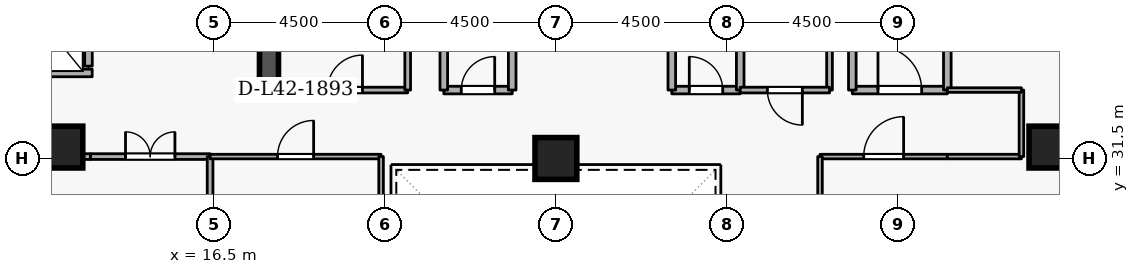
"""IFC4 building model, lengths in metres.
Left out: names, types, materials, properties, quantities, classifications, styles, units other than length and angle.
Written with IfcOpenShell. Run it as: python <this file> out.ifc"""

import sys

from ifc_helpers import new_model, si_unit, direction, frame, frame_2d, origin, origin_2d, place, context, subcontext, project, spatial, rectangle, extrude, element, fill, save


model = new_model("IFC4")
c1 = context("Model", 3, precision=1e-05, world=origin(), true_north=direction((0.0, 1.0)))
c2 = subcontext(c1, "Body", "Model", "MODEL_VIEW")
j1 = project(units=[si_unit("LENGTHUNIT", "METRE"), si_unit("PLANEANGLEUNIT", "RADIAN")], contexts=[c1])
p1 = place(None, origin())
s1 = spatial("IfcSite", under=j1, at=p1, CompositionType="ELEMENT")
p2 = place(p1, origin())
s2 = spatial("IfcBuilding", under=s1, at=p2, CompositionType="ELEMENT")
p3 = place(p2, frame((0.0, 0.0, 159.9)))
s3 = spatial("IfcBuildingStorey", under=s2, at=p3, CompositionType="ELEMENT", Elevation=159.9)
p4 = place(p3, frame((17.95, 33.1, 0.0), z_axis=(0.0, 0.0, 1.0), x_axis=(0.0, 1.0, 0.0)))
e1 = element("IfcWall", 1, at=p4, inside=s3, PredefinedType="SHEAR", context=c2, shape_type="SweptSolid", body=[
    extrude(rectangle(XDim=5.8, YDim=0.5, at=frame_2d((2.9, 0.0))), origin(), (0.0, 0.0, 1.0), 3.6),
])
for number, where, z_axis, x_axis in (
    (2, (12.5, 31.8, 0.0), (0.0, 0.0, 1.0), (1.0, 0.0, 0.0)),
    (3, (38.5, 31.8, 0.0), (0.0, 0.0, 1.0), (1.0, 0.0, 0.0)),
    (4, (25.5, 31.5, 0.0), (0.0, 0.0, 1.0), (1.0, 0.0, 0.0)),
):
    element("IfcColumn", number, at=place(p3, frame(where, z_axis=z_axis, x_axis=x_axis)), inside=s3, PredefinedType="COLUMN", context=c2, shape_type="SweptSolid", body=[
        extrude(rectangle(XDim=1.1, YDim=1.1, at=origin_2d()), origin(), (0.0, 0.0, 1.0), 3.6),
    ])
p5 = place(p3, frame((13.2, 33.93, 0.0), z_axis=(0.0, 0.0, 1.0), x_axis=(0.0, 1.0, 0.0)))
e5 = element("IfcWall", 5, at=p5, inside=s3, PredefinedType="STANDARD", context=c2, shape_type="SweptSolid", body=[
    extrude(rectangle(XDim=1.94, YDim=0.2, at=frame_2d((0.97, 0.0))), origin(), (0.0, 0.0, 1.0), 3.34),
])
p6 = place(p5, frame((0.46, 0.0, 0.0)))
e6 = element("IfcOpeningElement", 6, at=p6, cuts=e5, PredefinedType="OPENING", context=c2, shape_type="SweptSolid", body=[
    extrude(rectangle(XDim=1.02, YDim=2.06, at=frame_2d((0.51, 1.03))), frame((0.0, 0.11, 0.0), z_axis=(0.0, -1.0, 0.0), x_axis=(1.0, 0.0, 0.0)), (0.0, 0.0, 1.0), 0.22),
])
p7 = place(p3, frame((11.002, 33.75, 0.0), z_axis=(0.0, 0.0, 1.0), x_axis=(1.0, 0.0, 0.0)))
e7 = element("IfcWall", 7, at=p7, inside=s3, PredefinedType="STANDARD", context=c2, shape_type="SweptSolid", body=[
    extrude(rectangle(XDim=2.296, YDim=0.2, at=frame_2d((1.148, 0.0))), origin(), (0.0, 0.0, 1.0), 3.34),
])
p8 = place(p3, frame((33.3, 33.3, 0.0), z_axis=(0.0, 0.0, 1.0), x_axis=(1.0, 0.0, 0.0)))
e8 = element("IfcWall", 8, at=p8, inside=s3, PredefinedType="STANDARD", context=c2, shape_type="SweptSolid", body=[
    extrude(rectangle(XDim=2.5, YDim=0.2, at=frame_2d((1.25, 0.0))), origin(), (0.0, 0.0, 1.0), 3.34),
])
p9 = place(p8, frame((0.675, 0.0, 0.0)))
e9 = element("IfcOpeningElement", 9, at=p9, cuts=e8, PredefinedType="OPENING", context=c2, shape_type="SweptSolid", body=[
    extrude(rectangle(XDim=1.15, YDim=2.1, at=frame_2d((0.575, 1.05))), frame((0.0, 0.11, 0.0), z_axis=(0.0, -1.0, 0.0), x_axis=(1.0, 0.0, 0.0)), (0.0, 0.0, 1.0), 0.22),
])
p10 = place(p3, frame((35.8, 33.3, 0.0), z_axis=(0.0, 0.0, 1.0), x_axis=(0.0, 1.0, 0.0)))
e10 = element("IfcWall", 10, at=p10, inside=s3, PredefinedType="STANDARD", context=c2, shape_type="SweptSolid", body=[
    extrude(rectangle(XDim=5.7, YDim=0.2, at=frame_2d((2.85, 0.0))), origin(), (0.0, 0.0, 1.0), 3.34),
])
p11 = place(p3, frame((33.3, 35.6, 0.0), z_axis=(0.0, 0.0, 1.0), x_axis=(0.0, -1.0, 0.0)))
e11 = element("IfcWall", 11, at=p11, inside=s3, PredefinedType="STANDARD", context=c2, shape_type="SweptSolid", body=[
    extrude(rectangle(XDim=2.3, YDim=0.2, at=frame_2d((1.15, 0.0))), origin(), (0.0, 0.0, 1.0), 2.545),
])
p12 = place(p3, frame((22.55, 33.3, 0.0), z_axis=(0.0, 0.0, 1.0), x_axis=(1.0, 0.0, 0.0)))
e12 = element("IfcWall", 12, at=p12, inside=s3, PredefinedType="STANDARD", context=c2, shape_type="SweptSolid", body=[
    extrude(rectangle(XDim=1.8, YDim=0.2, at=frame_2d((0.9, 0.0))), origin(), (0.0, 0.0, 1.0), 3.34),
])
p13 = place(p12, frame((0.46, 0.0, 0.0)))
e13 = element("IfcOpeningElement", 13, at=p13, cuts=e12, PredefinedType="OPENING", context=c2, shape_type="SweptSolid", body=[
    extrude(rectangle(XDim=0.88, YDim=2.04, at=frame_2d((0.44, 1.02))), frame((0.0, 0.11, 0.0), z_axis=(0.0, -1.0, 0.0), x_axis=(1.0, 0.0, 0.0)), (0.0, 0.0, 1.0), 0.22),
])
for number, where, z_axis, x_axis in (
    (14, (24.35, 33.3, 0.0), (0.0, 0.0, 1.0), (0.0, 1.0, 0.0)),
    (15, (22.55, 35.35, 0.0), (0.0, 0.0, 1.0), (0.0, -1.0, 0.0)),
):
    element("IfcWall", number, at=place(p3, frame(where, z_axis=z_axis, x_axis=x_axis)), inside=s3, PredefinedType="STANDARD", context=c2, shape_type="SweptSolid", body=[
        extrude(rectangle(XDim=2.05, YDim=0.2, at=frame_2d((1.025, 0.0))), origin(), (0.0, 0.0, 1.0), 3.34),
    ])
p14 = place(p3, frame((28.55, 33.3, 0.0), z_axis=(0.0, 0.0, 1.0), x_axis=(1.0, 0.0, 0.0)))
e16 = element("IfcWall", 16, at=p14, inside=s3, PredefinedType="STANDARD", context=c2, shape_type="SweptSolid", body=[
    extrude(rectangle(XDim=1.8, YDim=0.2, at=frame_2d((0.9, 0.0))), origin(), (0.0, 0.0, 1.0), 3.34),
])
p15 = place(p14, frame((0.46, 0.0, 0.0)))
e17 = element("IfcOpeningElement", 17, at=p15, cuts=e16, PredefinedType="OPENING", context=c2, shape_type="SweptSolid", body=[
    extrude(rectangle(XDim=0.88, YDim=2.04, at=frame_2d((0.44, 1.02))), frame((0.0, 0.11, 0.0), z_axis=(0.0, -1.0, 0.0), x_axis=(1.0, 0.0, 0.0)), (0.0, 0.0, 1.0), 0.22),
])
for number, where, z_axis, x_axis in (
    (18, (30.35, 33.3, 0.0), (0.0, 0.0, 1.0), (0.0, 1.0, 0.0)),
    (19, (28.55, 35.35, 0.0), (0.0, 0.0, 1.0), (0.0, -1.0, 0.0)),
):
    element("IfcWall", number, at=place(p3, frame(where, z_axis=z_axis, x_axis=x_axis)), inside=s3, PredefinedType="STANDARD", context=c2, shape_type="SweptSolid", body=[
        extrude(rectangle(XDim=2.05, YDim=0.2, at=frame_2d((1.025, 0.0))), origin(), (0.0, 0.0, 1.0), 3.34),
    ])
p16 = place(p3, frame((18.3, 33.3, 0.0), z_axis=(0.0, 0.0, 1.0), x_axis=(1.0, 0.0, 0.0)))
e20 = element("IfcWall", 20, at=p16, inside=s3, PredefinedType="PARTITIONING", context=c2, shape_type="SweptSolid", body=[
    extrude(rectangle(XDim=3.3, YDim=0.15, at=frame_2d((1.65, 0.0))), origin(), (0.0, 0.0, 1.0), 3.34),
])
p17 = place(p16, frame((1.19, 0.0, 0.0)))
e21 = element("IfcOpeningElement", 21, at=p17, cuts=e20, PredefinedType="OPENING", context=c2, shape_type="SweptSolid", body=[
    extrude(rectangle(XDim=0.92, YDim=2.08, at=frame_2d((0.46, 1.04))), frame((0.0, 0.085, 0.0), z_axis=(0.0, -1.0, 0.0), x_axis=(1.0, 0.0, 0.0)), (0.0, 0.0, 1.0), 0.17),
])
p18 = place(p3, frame((21.6, 33.3, 0.0), z_axis=(0.0, 0.0, 1.0), x_axis=(0.0, 1.0, 0.0)))
e22 = element("IfcWall", 22, at=p18, inside=s3, PredefinedType="PARTITIONING", context=c2, shape_type="SweptSolid", body=[
    extrude(rectangle(XDim=2.05, YDim=0.15, at=frame_2d((1.025, 0.0))), origin(), (0.0, 0.0, 1.0), 3.34),
])
p19 = place(p3, frame((32.7, 35.35, 0.0), z_axis=(0.0, 0.0, 1.0), x_axis=(0.0, -1.0, 0.0)))
e23 = element("IfcWall", 23, at=p19, inside=s3, PredefinedType="PARTITIONING", context=c2, shape_type="SweptSolid", body=[
    extrude(rectangle(XDim=2.05, YDim=0.15, at=frame_2d((1.025, 0.0))), origin(), (0.0, 0.0, 1.0), 2.545),
])
p20 = place(p3, frame((32.7, 33.3, 0.0), z_axis=(0.0, 0.0, 1.0), x_axis=(-1.0, 0.0, 0.0)))
e24 = element("IfcWall", 24, at=p20, inside=s3, PredefinedType="PARTITIONING", context=c2, shape_type="SweptSolid", body=[
    extrude(rectangle(XDim=2.35, YDim=0.15, at=frame_2d((1.175, 0.0))), origin(), (0.0, 0.0, 1.0), 3.34),
])
p21 = place(p20, frame((0.715, 0.0, 0.0)))
e25 = element("IfcOpeningElement", 25, at=p21, cuts=e24, PredefinedType="OPENING", context=c2, shape_type="SweptSolid", body=[
    extrude(rectangle(XDim=0.92, YDim=2.08, at=frame_2d((0.46, 1.04))), frame((0.0, 0.085, 0.0), z_axis=(0.0, -1.0, 0.0), x_axis=(1.0, 0.0, 0.0)), (0.0, 0.0, 1.0), 0.17),
])
p22 = place(p3, frame((13.25, 31.55, 0.0), z_axis=(0.0, 0.0, 1.0), x_axis=(1.0, 0.0, 0.0)))
e26 = element("IfcWall", 26, at=p22, inside=s3, PredefinedType="PARTITIONING", context=c2, shape_type="SweptSolid", body=[
    extrude(rectangle(XDim=3.15, YDim=0.15, at=frame_2d((1.575, 0.0))), origin(), (0.0, 0.0, 1.0), 3.34),
])
p23 = place(p22, frame((0.925, 0.0, 0.0)))
e27 = element("IfcOpeningElement", 27, at=p23, cuts=e26, PredefinedType="OPENING", context=c2, shape_type="SweptSolid", body=[
    extrude(rectangle(XDim=1.3, YDim=2.12, at=frame_2d((0.65, 1.06))), frame((0.0, 0.085, 0.0), z_axis=(0.0, -1.0, 0.0), x_axis=(1.0, 0.0, 0.0)), (0.0, 0.0, 1.0), 0.17),
])
p24 = place(p3, frame((16.4, 31.55, 0.0), z_axis=(0.0, 0.0, 1.0), x_axis=(0.0, -1.0, 0.0)))
e28 = element("IfcWall", 28, at=p24, inside=s3, PredefinedType="PARTITIONING", context=c2, shape_type="SweptSolid", body=[
    extrude(rectangle(XDim=4.55, YDim=0.15, at=frame_2d((2.275, 0.0))), origin(), (0.0, 0.0, 1.0), 3.34),
])
p25 = place(p3, frame((10.9, 31.55, 0.0), z_axis=(0.0, 0.0, 1.0), x_axis=(1.0, 0.0, 0.0)))
e29 = element("IfcWall", 29, at=p25, inside=s3, PredefinedType="PARTITIONING", context=c2, shape_type="SweptSolid", body=[
    extrude(rectangle(XDim=2.35, YDim=0.15, at=frame_2d((1.175, 0.0))), origin(), (0.0, 0.0, 1.0), 3.34),
])
p26 = place(p3, frame((16.4, 31.55, 0.0), z_axis=(0.0, 0.0, 1.0), x_axis=(1.0, 0.0, 0.0)))
e30 = element("IfcWall", 30, at=p26, inside=s3, PredefinedType="PARTITIONING", context=c2, shape_type="SweptSolid", body=[
    extrude(rectangle(XDim=4.5, YDim=0.12, at=frame_2d((2.25, 0.0))), origin(), (0.0, 0.0, 1.0), 3.34),
])
p27 = place(p26, frame((1.775, 0.0, 0.0)))
e31 = element("IfcOpeningElement", 31, at=p27, cuts=e30, PredefinedType="OPENING", context=c2, shape_type="SweptSolid", body=[
    extrude(rectangle(XDim=0.95, YDim=2.1, at=frame_2d((0.475, 1.05))), frame((0.0, 0.07, 0.0), z_axis=(0.0, -1.0, 0.0), x_axis=(1.0, 0.0, 0.0)), (0.0, 0.0, 1.0), 0.14),
])
p28 = place(p3, frame((20.9, 31.55, 0.0), z_axis=(0.0, 0.0, 1.0), x_axis=(0.0, -1.0, 0.0)))
e32 = element("IfcWall", 32, at=p28, inside=s3, PredefinedType="PARTITIONING", context=c2, shape_type="SweptSolid", body=[
    extrude(rectangle(XDim=9.1, YDim=0.12, at=frame_2d((4.55, 0.0))), origin(), (0.0, 0.0, 1.0), 3.34),
])
p29 = place(p3, frame((32.45, 31.55, 0.0), z_axis=(0.0, 0.0, 1.0), x_axis=(1.0, 0.0, 0.0)))
e33 = element("IfcWall", 33, at=p29, inside=s3, PredefinedType="PARTITIONING", context=c2, shape_type="SweptSolid", body=[
    extrude(rectangle(XDim=3.35, YDim=0.12, at=frame_2d((1.675, 0.0))), origin(), (0.0, 0.0, 1.0), 3.34),
])
p30 = place(p29, frame((1.15, 0.0, 0.0)))
e34 = element("IfcOpeningElement", 34, at=p30, cuts=e33, PredefinedType="OPENING", context=c2, shape_type="SweptSolid", body=[
    extrude(rectangle(XDim=1.05, YDim=2.1, at=frame_2d((0.525, 1.05))), frame((0.0, 0.07, 0.0), z_axis=(0.0, -1.0, 0.0), x_axis=(1.0, 0.0, 0.0)), (0.0, 0.0, 1.0), 0.14),
])
p31 = place(p3, frame((35.8, 31.55, 0.0), z_axis=(0.0, 0.0, 1.0), x_axis=(1.0, 0.0, 0.0)))
e35 = element("IfcWall", 35, at=p31, inside=s3, PredefinedType="PARTITIONING", context=c2, shape_type="SweptSolid", body=[
    extrude(rectangle(XDim=1.95, YDim=0.12, at=frame_2d((0.975, 0.0))), origin(), (0.0, 0.0, 1.0), 3.34),
])
p32 = place(p3, frame((37.75, 31.55, 0.0), z_axis=(0.0, 0.0, 1.0), x_axis=(0.0, 1.0, 0.0)))
e36 = element("IfcWall", 36, at=p32, inside=s3, PredefinedType="PARTITIONING", context=c2, shape_type="SweptSolid", body=[
    extrude(rectangle(XDim=1.75, YDim=0.12, at=frame_2d((0.875, 0.0))), origin(), (0.0, 0.0, 1.0), 3.34),
])
p33 = place(p3, frame((37.75, 33.3, 0.0), z_axis=(0.0, 0.0, 1.0), x_axis=(-1.0, 0.0, 0.0)))
e37 = element("IfcWall", 37, at=p33, inside=s3, PredefinedType="PARTITIONING", context=c2, shape_type="SweptSolid", body=[
    extrude(rectangle(XDim=1.95, YDim=0.12, at=frame_2d((0.975, 0.0))), origin(), (0.0, 0.0, 1.0), 3.34),
])
p34 = place(p3, frame((32.45, 29.25, 0.0), z_axis=(0.0, 0.0, 1.0), x_axis=(0.0, 1.0, 0.0)))
e38 = element("IfcWall", 38, at=p34, inside=s3, PredefinedType="PARTITIONING", context=c2, shape_type="SweptSolid", body=[
    extrude(rectangle(XDim=2.3, YDim=0.12, at=frame_2d((1.15, 0.0))), origin(), (0.0, 0.0, 1.0), 3.34),
])
p35 = place(p9, origin())
e39 = element("IfcDoor", 39, at=p35, inside=s3, OperationType="SINGLE_SWING_LEFT", PredefinedType="DOOR", context=c2, shape_type="SweptSolid", body=[
    extrude(rectangle(XDim=1.15, YDim=2.1, at=frame_2d((0.575, 1.05))), frame((0.0, 0.025, 0.0), z_axis=(0.0, -1.0, 0.0), x_axis=(1.0, 0.0, 0.0)), (0.0, 0.0, 1.0), 0.05),
])
fill(e9, e39)
p36 = place(p13, origin())
e40 = element("IfcDoor", 40, at=p36, inside=s3, OperationType="SINGLE_SWING_RIGHT", PredefinedType="DOOR", context=c2, shape_type="SweptSolid", body=[
    extrude(rectangle(XDim=0.88, YDim=2.04, at=frame_2d((0.44, 1.02))), frame((0.0, 0.025, 0.0), z_axis=(0.0, -1.0, 0.0), x_axis=(1.0, 0.0, 0.0)), (0.0, 0.0, 1.0), 0.05),
])
fill(e13, e40)
p37 = place(p15, origin())
e41 = element("IfcDoor", 41, at=p37, inside=s3, OperationType="SINGLE_SWING_LEFT", PredefinedType="DOOR", context=c2, shape_type="SweptSolid", body=[
    extrude(rectangle(XDim=0.88, YDim=2.04, at=frame_2d((0.44, 1.02))), frame((0.0, 0.025, 0.0), z_axis=(0.0, -1.0, 0.0), x_axis=(1.0, 0.0, 0.0)), (0.0, 0.0, 1.0), 0.05),
])
fill(e17, e41)
p38 = place(p17, origin())
e42 = element("IfcDoor", 42, at=p38, inside=s3, OperationType="SINGLE_SWING_RIGHT", PredefinedType="DOOR", context=c2, shape_type="SweptSolid", body=[
    extrude(rectangle(XDim=0.92, YDim=2.08, at=frame_2d((0.46, 1.04))), frame((0.0, 0.025, 0.0), z_axis=(0.0, -1.0, 0.0), x_axis=(1.0, 0.0, 0.0)), (0.0, 0.0, 1.0), 0.05),
])
fill(e21, e42)
p39 = place(p21, origin())
e43 = element("IfcDoor", 43, at=p39, inside=s3, OperationType="SINGLE_SWING_LEFT", PredefinedType="DOOR", context=c2, shape_type="SweptSolid", body=[
    extrude(rectangle(XDim=0.92, YDim=2.08, at=frame_2d((0.46, 1.04))), frame((0.0, 0.025, 0.0), z_axis=(0.0, -1.0, 0.0), x_axis=(1.0, 0.0, 0.0)), (0.0, 0.0, 1.0), 0.05),
])
fill(e25, e43)
p40 = place(p23, origin())
e44 = element("IfcDoor", 44, at=p40, inside=s3, OperationType="DOUBLE_DOOR_SINGLE_SWING", PredefinedType="DOOR", context=c2, shape_type="SweptSolid", body=[
    extrude(rectangle(XDim=1.3, YDim=2.12, at=frame_2d((0.65, 1.06))), frame((0.0, 0.025, 0.0), z_axis=(0.0, -1.0, 0.0), x_axis=(1.0, 0.0, 0.0)), (0.0, 0.0, 1.0), 0.05),
])
fill(e27, e44)
p41 = place(p27, origin())
e45 = element("IfcDoor", 45, at=p41, inside=s3, OperationType="SINGLE_SWING_RIGHT", PredefinedType="DOOR", context=c2, shape_type="SweptSolid", body=[
    extrude(rectangle(XDim=0.95, YDim=2.1, at=frame_2d((0.475, 1.05))), frame((0.0, 0.025, 0.0), z_axis=(0.0, -1.0, 0.0), x_axis=(1.0, 0.0, 0.0)), (0.0, 0.0, 1.0), 0.05),
])
fill(e31, e45)
p42 = place(p30, origin())
e46 = element("IfcDoor", 46, at=p42, inside=s3, OperationType="SINGLE_SWING_RIGHT", PredefinedType="DOOR", context=c2, shape_type="SweptSolid", body=[
    extrude(rectangle(XDim=1.05, YDim=2.1, at=frame_2d((0.525, 1.05))), frame((0.0, 0.025, 0.0), z_axis=(0.0, -1.0, 0.0), x_axis=(1.0, 0.0, 0.0)), (0.0, 0.0, 1.0), 0.05),
])
fill(e34, e46)
save(model, sys.argv[1])
